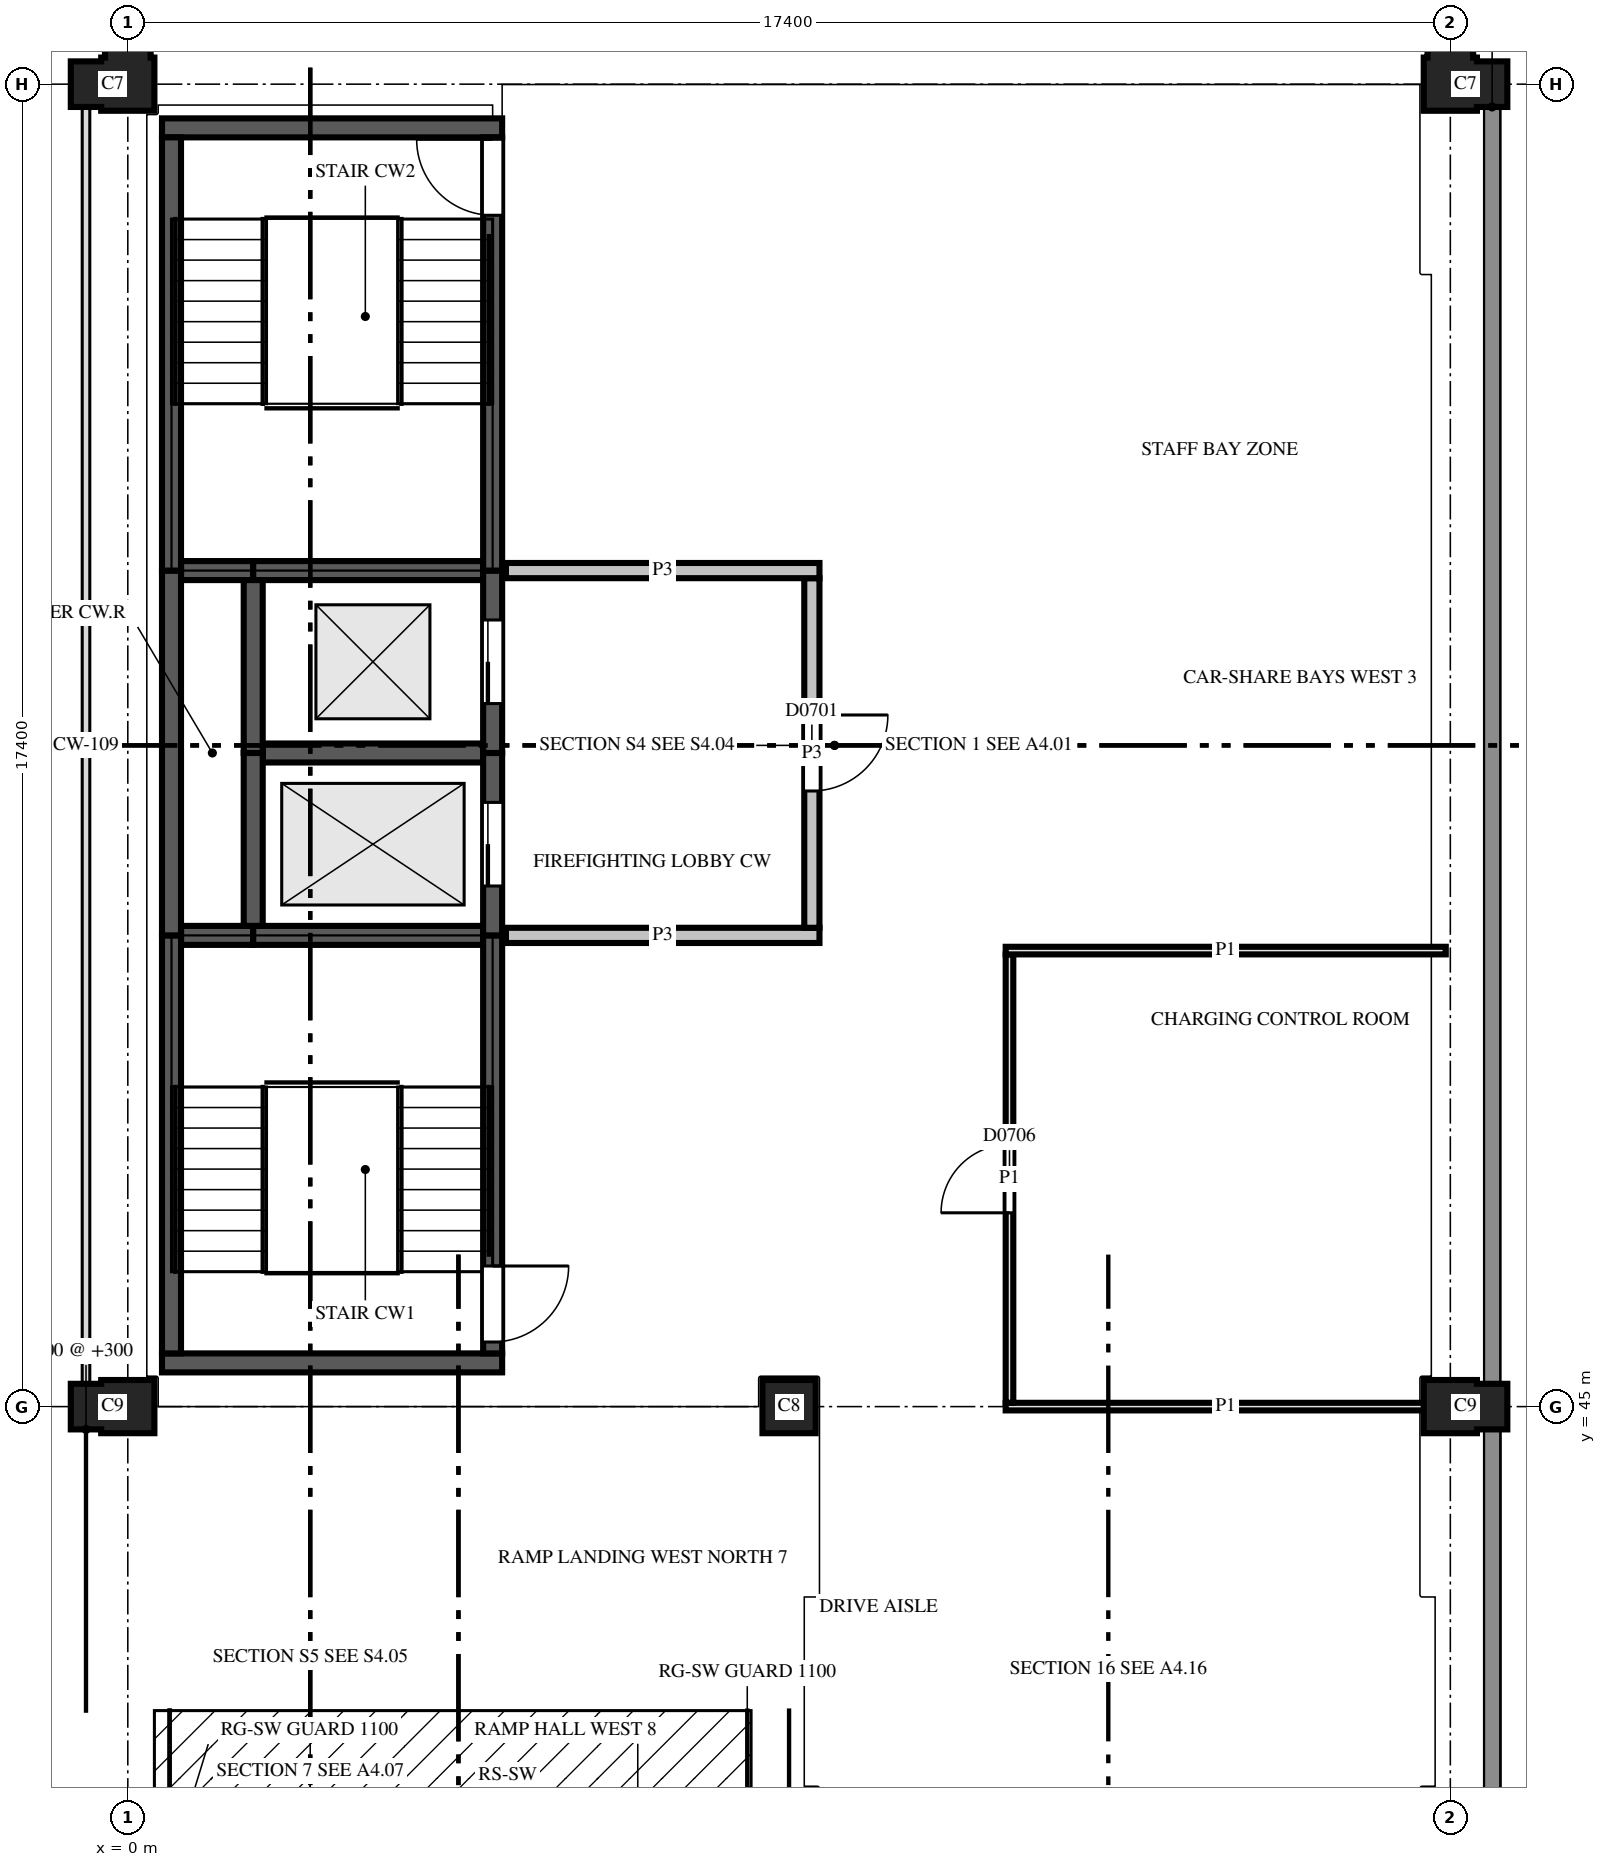
"""IFC4 building model, lengths in metres.
Left out: names, types, materials, properties, quantities, classifications, styles, units other than length and angle.
Written with IfcOpenShell. Run it as: python <this file> out.ifc"""

import sys

from ifc_helpers import new_model, si_unit, direction, frame, frame_2d, origin, place, context, subcontext, project, spatial, polyline, rectangle, outline, extrude, element, fill, save


model = new_model("IFC4")
c1 = context("Model", 3, precision=1e-05, world=origin(), true_north=direction((0.0, 1.0)))
c2 = subcontext(c1, "Body", "Model", "MODEL_VIEW")
j1 = project(units=[si_unit("LENGTHUNIT", "METRE"), si_unit("PLANEANGLEUNIT", "RADIAN")], contexts=[c1])
p1 = place(None, origin())
s1 = spatial("IfcSite", under=j1, at=p1, CompositionType="ELEMENT")
p2 = place(p1, origin())
s2 = spatial("IfcBuilding", under=s1, at=p2, CompositionType="ELEMENT")
p3 = place(p2, frame((0.0, 0.0, 26.7)))
s3 = spatial("IfcBuildingStorey", under=s2, at=p3, CompositionType="ELEMENT", Elevation=26.7)
p4 = place(p3, frame((0.0, 45.0, 0.0), z_axis=(0.0, 0.0, 1.0), x_axis=(-1.0, 0.0, 0.0)))
e1 = element("IfcColumn", 1, at=p4, inside=s3, PredefinedType="COLUMN", context=c2, shape_type="SweptSolid", body=[
    extrude(outline(polyline([(-0.35, -0.35), (0.35, -0.35), (0.35, -0.3), (0.75, -0.3), (0.75, 0.3), (0.35, 0.3), (0.35, 0.35), (-0.35, 0.35), (-0.35, -0.35)])), origin(), (0.0, 0.0, 1.0), 3.7),
])
p5 = place(p3, frame((8.7, 45.0, 0.0), z_axis=(0.0, 0.0, 1.0), x_axis=(1.0, 0.0, 0.0)))
e2 = element("IfcColumn", 2, at=p5, inside=s3, PredefinedType="COLUMN", context=c2, shape_type="SweptSolid", body=[
    extrude(outline(polyline([(-0.35, -0.35), (0.35, -0.35), (0.35, 0.35), (-0.35, 0.35), (-0.35, -0.35)])), origin(), (0.0, 0.0, 1.0), 3.7),
])
p6 = place(p3, frame((17.4, 45.0, 0.0), z_axis=(0.0, 0.0, 1.0), x_axis=(1.0, 0.0, 0.0)))
e3 = element("IfcColumn", 3, at=p6, inside=s3, PredefinedType="COLUMN", context=c2, shape_type="SweptSolid", body=[
    extrude(outline(polyline([(-0.35, -0.35), (0.35, -0.35), (0.35, -0.3), (0.75, -0.3), (0.75, 0.3), (0.35, 0.3), (0.35, 0.35), (-0.35, 0.35), (-0.35, -0.35)])), origin(), (0.0, 0.0, 1.0), 3.7),
])
for number, where, z_axis, x_axis in (
    (4, (0.0, 62.4, 0.0), (0.0, 0.0, 1.0), (0.0, 1.0, 0.0)),
    (5, (17.4, 62.4, 0.0), (0.0, 0.0, 1.0), (1.0, 0.0, 0.0)),
):
    element("IfcColumn", number, at=place(p3, frame(where, z_axis=z_axis, x_axis=x_axis)), inside=s3, PredefinedType="COLUMN", context=c2, shape_type="SweptSolid", body=[
        extrude(outline(polyline([(-0.35, -0.35), (0.35, -0.35), (0.35, -0.3), (0.75, -0.3), (0.75, 0.3), (0.35, 0.3), (0.35, 0.35), (0.3, 0.35), (0.3, 0.75), (-0.3, 0.75), (-0.3, 0.35), (-0.35, 0.35), (-0.35, -0.35)])), origin(), (0.0, 0.0, 1.0), 3.7),
    ])
p7 = place(p3, frame((0.45, 45.575, 0.0), z_axis=(0.0, 0.0, 1.0), x_axis=(1.0, 0.0, 0.0)))
e6 = element("IfcWall", 6, at=p7, inside=s3, PredefinedType="SHEAR", context=c2, shape_type="SweptSolid", body=[
    extrude(rectangle(XDim=4.475, YDim=0.25, at=frame_2d((2.238, 0.0))), origin(), (0.0, 0.0, 1.0), 3.7),
])
p8 = place(p3, frame((0.7, 51.2, 0.0), z_axis=(0.0, 0.0, 1.0), x_axis=(1.0, 0.0, 0.0)))
e7 = element("IfcWall", 7, at=p8, inside=s3, PredefinedType="SHEAR", context=c2, shape_type="SweptSolid", body=[
    extrude(rectangle(XDim=0.95, YDim=0.25, at=frame_2d((0.475, 0.0))), origin(), (0.0, 0.0, 1.0), 3.7),
])
p9 = place(p3, frame((1.65, 51.2, 0.0), z_axis=(0.0, 0.0, 1.0), x_axis=(1.0, 0.0, 0.0)))
e8 = element("IfcWall", 8, at=p9, inside=s3, PredefinedType="SHEAR", context=c2, shape_type="SweptSolid", body=[
    extrude(rectangle(XDim=3.025, YDim=0.25, at=frame_2d((1.513, 0.0))), origin(), (0.0, 0.0, 1.0), 3.7),
])
p10 = place(p3, frame((1.775, 53.6, 0.0), z_axis=(0.0, 0.0, 1.0), x_axis=(1.0, 0.0, 0.0)))
e9 = element("IfcWall", 9, at=p10, inside=s3, PredefinedType="SHEAR", context=c2, shape_type="SweptSolid", body=[
    extrude(rectangle(XDim=2.9, YDim=0.25, at=frame_2d((1.45, 0.0))), origin(), (0.0, 0.0, 1.0), 3.7),
])
p11 = place(p3, frame((0.7, 56.0, 0.0), z_axis=(0.0, 0.0, 1.0), x_axis=(1.0, 0.0, 0.0)))
e10 = element("IfcWall", 10, at=p11, inside=s3, PredefinedType="SHEAR", context=c2, shape_type="SweptSolid", body=[
    extrude(rectangle(XDim=0.95, YDim=0.25, at=frame_2d((0.475, 0.0))), origin(), (0.0, 0.0, 1.0), 3.7),
])
p12 = place(p3, frame((1.65, 56.0, 0.0), z_axis=(0.0, 0.0, 1.0), x_axis=(1.0, 0.0, 0.0)))
e11 = element("IfcWall", 11, at=p12, inside=s3, PredefinedType="SHEAR", context=c2, shape_type="SweptSolid", body=[
    extrude(rectangle(XDim=3.025, YDim=0.25, at=frame_2d((1.513, 0.0))), origin(), (0.0, 0.0, 1.0), 3.7),
])
p13 = place(p3, frame((0.45, 61.825, 0.0), z_axis=(0.0, 0.0, 1.0), x_axis=(1.0, 0.0, 0.0)))
e12 = element("IfcWall", 12, at=p13, inside=s3, PredefinedType="SHEAR", context=c2, shape_type="SweptSolid", body=[
    extrude(rectangle(XDim=4.475, YDim=0.25, at=frame_2d((2.238, 0.0))), origin(), (0.0, 0.0, 1.0), 3.7),
])
p14 = place(p3, frame((0.575, 45.7, 0.0), z_axis=(0.0, 0.0, 1.0), x_axis=(0.0, 1.0, 0.0)))
e13 = element("IfcWall", 13, at=p14, inside=s3, PredefinedType="SHEAR", context=c2, shape_type="SweptSolid", body=[
    extrude(rectangle(XDim=5.5, YDim=0.25, at=frame_2d((2.75, 0.0))), origin(), (0.0, 0.0, 1.0), 3.7),
])
p15 = place(p3, frame((0.575, 51.2, 0.0), z_axis=(0.0, 0.0, 1.0), x_axis=(0.0, 1.0, 0.0)))
e14 = element("IfcWall", 14, at=p15, inside=s3, PredefinedType="SHEAR", context=c2, shape_type="SweptSolid", body=[
    extrude(rectangle(XDim=4.8, YDim=0.25, at=frame_2d((2.4, 0.0))), origin(), (0.0, 0.0, 1.0), 3.7),
])
p16 = place(p3, frame((0.575, 56.0, 0.0), z_axis=(0.0, 0.0, 1.0), x_axis=(0.0, 1.0, 0.0)))
e15 = element("IfcWall", 15, at=p16, inside=s3, PredefinedType="SHEAR", context=c2, shape_type="SweptSolid", body=[
    extrude(rectangle(XDim=5.7, YDim=0.25, at=frame_2d((2.85, 0.0))), origin(), (0.0, 0.0, 1.0), 3.7),
])
p17 = place(p3, frame((1.65, 51.325, 0.0), z_axis=(0.0, 0.0, 1.0), x_axis=(0.0, 1.0, 0.0)))
e16 = element("IfcWall", 16, at=p17, inside=s3, PredefinedType="SHEAR", context=c2, shape_type="SweptSolid", body=[
    extrude(rectangle(XDim=2.275, YDim=0.25, at=frame_2d((1.138, 0.0))), origin(), (0.0, 0.0, 1.0), 3.7),
])
p18 = place(p3, frame((1.65, 53.6, 0.0), z_axis=(0.0, 0.0, 1.0), x_axis=(0.0, 1.0, 0.0)))
e17 = element("IfcWall", 17, at=p18, inside=s3, PredefinedType="SHEAR", context=c2, shape_type="SweptSolid", body=[
    extrude(rectangle(XDim=2.275, YDim=0.25, at=frame_2d((1.137, 0.0))), origin(), (0.0, 0.0, 1.0), 3.7),
])
p19 = place(p3, frame((4.8, 45.7, 0.0), z_axis=(0.0, 0.0, 1.0), x_axis=(0.0, 1.0, 0.0)))
e18 = element("IfcWall", 18, at=p19, inside=s3, PredefinedType="SHEAR", context=c2, shape_type="SweptSolid", body=[
    extrude(rectangle(XDim=5.5, YDim=0.25, at=frame_2d((2.75, 0.0))), origin(), (0.0, 0.0, 1.0), 3.7),
])
p20 = place(p19, frame((0.15, 0.0, 0.0)))
e19 = element("IfcOpeningElement", 19, at=p20, cuts=e18, PredefinedType="OPENING", context=c2, shape_type="SweptSolid", body=[
    extrude(rectangle(XDim=1.0, YDim=2.1, at=frame_2d((0.5, 1.05))), frame((0.0, 0.135, 0.0), z_axis=(0.0, -1.0, 0.0), x_axis=(1.0, 0.0, 0.0)), (0.0, 0.0, 1.0), 0.27),
])
p21 = place(p3, frame((4.8, 51.2, 0.0), z_axis=(0.0, 0.0, 1.0), x_axis=(0.0, 1.0, 0.0)))
e20 = element("IfcWall", 20, at=p21, inside=s3, PredefinedType="SHEAR", context=c2, shape_type="SweptSolid", body=[
    extrude(rectangle(XDim=2.4, YDim=0.25, at=frame_2d((1.2, 0.0))), origin(), (0.0, 0.0, 1.0), 3.7),
])
p22 = place(p21, frame((0.65, 0.0, 0.0)))
e21 = element("IfcOpeningElement", 21, at=p22, cuts=e20, PredefinedType="OPENING", context=c2, shape_type="SweptSolid", body=[
    extrude(rectangle(XDim=1.1, YDim=2.1, at=frame_2d((0.55, 1.05))), frame((0.0, 0.135, 0.0), z_axis=(0.0, -1.0, 0.0), x_axis=(1.0, 0.0, 0.0)), (0.0, 0.0, 1.0), 0.27),
])
p23 = place(p3, frame((4.8, 53.6, 0.0), z_axis=(0.0, 0.0, 1.0), x_axis=(0.0, 1.0, 0.0)))
e22 = element("IfcWall", 22, at=p23, inside=s3, PredefinedType="SHEAR", context=c2, shape_type="SweptSolid", body=[
    extrude(rectangle(XDim=2.4, YDim=0.25, at=frame_2d((1.2, 0.0))), origin(), (0.0, 0.0, 1.0), 3.7),
])
p24 = place(p23, frame((0.65, 0.0, 0.0)))
e23 = element("IfcOpeningElement", 23, at=p24, cuts=e22, PredefinedType="OPENING", context=c2, shape_type="SweptSolid", body=[
    extrude(rectangle(XDim=1.1, YDim=2.1, at=frame_2d((0.55, 1.05))), frame((0.0, 0.135, 0.0), z_axis=(0.0, -1.0, 0.0), x_axis=(1.0, 0.0, 0.0)), (0.0, 0.0, 1.0), 0.27),
])
p25 = place(p3, frame((4.8, 56.0, 0.0), z_axis=(0.0, 0.0, 1.0), x_axis=(0.0, 1.0, 0.0)))
e24 = element("IfcWall", 24, at=p25, inside=s3, PredefinedType="SHEAR", context=c2, shape_type="SweptSolid", body=[
    extrude(rectangle(XDim=5.7, YDim=0.25, at=frame_2d((2.85, 0.0))), origin(), (0.0, 0.0, 1.0), 3.7),
])
p26 = place(p25, frame((4.675, 0.0, 0.0)))
e25 = element("IfcOpeningElement", 25, at=p26, cuts=e24, PredefinedType="OPENING", context=c2, shape_type="SweptSolid", body=[
    extrude(rectangle(XDim=1.0, YDim=2.1, at=frame_2d((0.5, 1.05))), frame((0.0, 0.135, 0.0), z_axis=(0.0, -1.0, 0.0), x_axis=(1.0, 0.0, 0.0)), (0.0, 0.0, 1.0), 0.27),
])
p27 = place(p3, frame((11.55, 45.0, 0.0), z_axis=(0.0, 0.0, 1.0), x_axis=(1.0, 0.0, 0.0)))
e26 = element("IfcWall", 26, at=p27, inside=s3, PredefinedType="PARTITIONING", context=c2, shape_type="SweptSolid", body=[
    extrude(rectangle(XDim=5.79, YDim=0.1, at=frame_2d((2.895, 0.0))), origin(), (0.0, 0.0, 1.0), 2.88),
])
p28 = place(p3, frame((11.6, 50.95, 0.0), z_axis=(0.0, 0.0, 1.0), x_axis=(0.0, -1.0, 0.0)))
e27 = element("IfcWall", 27, at=p28, inside=s3, PredefinedType="PARTITIONING", context=c2, shape_type="SweptSolid", body=[
    extrude(rectangle(XDim=5.9, YDim=0.1, at=frame_2d((2.95, 0.0))), origin(), (0.0, 0.0, 1.0), 2.88),
])
p29 = place(p28, frame((2.5, 0.0, 0.0)))
e28 = element("IfcOpeningElement", 28, at=p29, cuts=e27, PredefinedType="OPENING", context=c2, shape_type="SweptSolid", body=[
    extrude(rectangle(XDim=0.9, YDim=2.1, at=frame_2d((0.45, 1.05))), frame((0.0, 0.06, 0.0), z_axis=(0.0, -1.0, 0.0), x_axis=(1.0, 0.0, 0.0)), (0.0, 0.0, 1.0), 0.12),
])
p30 = place(p3, frame((17.34, 51.0, 0.0), z_axis=(0.0, 0.0, 1.0), x_axis=(-1.0, 0.0, 0.0)))
e29 = element("IfcWall", 29, at=p30, inside=s3, PredefinedType="PARTITIONING", context=c2, shape_type="SweptSolid", body=[
    extrude(rectangle(XDim=5.79, YDim=0.1, at=frame_2d((2.895, 0.0))), origin(), (0.0, 0.0, 1.0), 2.88),
])
p31 = place(p3, frame((4.975, 51.2, 0.0), z_axis=(0.0, 0.0, 1.0), x_axis=(1.0, 0.0, 0.0)))
e30 = element("IfcWall", 30, at=p31, inside=s3, PredefinedType="PARTITIONING", context=c2, shape_type="SweptSolid", body=[
    extrude(rectangle(XDim=4.125, YDim=0.2, at=frame_2d((2.062, 0.0))), origin(), (0.0, 0.0, 1.0), 2.88),
])
p32 = place(p3, frame((9.0, 51.3, 0.0), z_axis=(0.0, 0.0, 1.0), x_axis=(0.0, 1.0, 0.0)))
e31 = element("IfcWall", 31, at=p32, inside=s3, PredefinedType="PARTITIONING", context=c2, shape_type="SweptSolid", body=[
    extrude(rectangle(XDim=4.6, YDim=0.2, at=frame_2d((2.3, 0.0))), origin(), (0.0, 0.0, 1.0), 2.88),
])
p33 = place(p32, frame((1.8, 0.0, 0.0)))
e32 = element("IfcOpeningElement", 32, at=p33, cuts=e31, PredefinedType="OPENING", context=c2, shape_type="SweptSolid", body=[
    extrude(rectangle(XDim=1.0, YDim=2.1, at=frame_2d((0.5, 1.05))), frame((0.0, 0.11, 0.0), z_axis=(0.0, -1.0, 0.0), x_axis=(1.0, 0.0, 0.0)), (0.0, 0.0, 1.0), 0.22),
])
p34 = place(p3, frame((9.1, 56.0, 0.0), z_axis=(0.0, 0.0, 1.0), x_axis=(-1.0, 0.0, 0.0)))
e33 = element("IfcWall", 33, at=p34, inside=s3, PredefinedType="PARTITIONING", context=c2, shape_type="SweptSolid", body=[
    extrude(rectangle(XDim=4.125, YDim=0.2, at=frame_2d((2.062, 0.0))), origin(), (0.0, 0.0, 1.0), 2.88),
])
p35 = place(p33, origin())
e34 = element("IfcDoor", 34, at=p35, inside=s3, OperationType="SINGLE_SWING_RIGHT", PredefinedType="DOOR", context=c2, shape_type="SweptSolid", body=[
    extrude(rectangle(XDim=1.0, YDim=2.1, at=frame_2d((0.5, 1.05))), frame((0.0, 0.025, 0.0), z_axis=(0.0, -1.0, 0.0), x_axis=(1.0, 0.0, 0.0)), (0.0, 0.0, 1.0), 0.05),
])
fill(e32, e34)
p36 = place(p29, origin())
e35 = element("IfcDoor", 35, at=p36, inside=s3, OperationType="SINGLE_SWING_RIGHT", PredefinedType="DOOR", context=c2, shape_type="SweptSolid", body=[
    extrude(rectangle(XDim=0.9, YDim=2.1, at=frame_2d((0.45, 1.05))), frame((0.0, 0.025, 0.0), z_axis=(0.0, -1.0, 0.0), x_axis=(1.0, 0.0, 0.0)), (0.0, 0.0, 1.0), 0.05),
])
fill(e28, e35)
p37 = place(p22, origin())
e36 = element("IfcDoor", 36, at=p37, inside=s3, OperationType="SLIDING_TO_LEFT", PredefinedType="DOOR", context=c2, shape_type="SweptSolid", body=[
    extrude(rectangle(XDim=1.1, YDim=2.1, at=frame_2d((0.55, 1.05))), frame((0.0, 0.025, 0.0), z_axis=(0.0, -1.0, 0.0), x_axis=(1.0, 0.0, 0.0)), (0.0, 0.0, 1.0), 0.05),
])
fill(e21, e36)
p38 = place(p24, origin())
e37 = element("IfcDoor", 37, at=p38, inside=s3, OperationType="SLIDING_TO_LEFT", PredefinedType="DOOR", context=c2, shape_type="SweptSolid", body=[
    extrude(rectangle(XDim=1.1, YDim=2.1, at=frame_2d((0.55, 1.05))), frame((0.0, 0.025, 0.0), z_axis=(0.0, -1.0, 0.0), x_axis=(1.0, 0.0, 0.0)), (0.0, 0.0, 1.0), 0.05),
])
fill(e23, e37)
p39 = place(p26, origin())
e38 = element("IfcDoor", 38, at=p39, inside=s3, OperationType="SINGLE_SWING_LEFT", PredefinedType="DOOR", context=c2, shape_type="SweptSolid", body=[
    extrude(rectangle(XDim=1.0, YDim=2.1, at=frame_2d((0.5, 1.05))), frame((0.0, 0.025, 0.0), z_axis=(0.0, -1.0, 0.0), x_axis=(1.0, 0.0, 0.0)), (0.0, 0.0, 1.0), 0.05),
])
fill(e25, e38)
p40 = place(p20, origin())
e39 = element("IfcDoor", 39, at=p40, inside=s3, OperationType="SINGLE_SWING_RIGHT", PredefinedType="DOOR", context=c2, shape_type="SweptSolid", body=[
    extrude(rectangle(XDim=1.0, YDim=2.1, at=frame_2d((0.5, 1.05))), frame((0.0, 0.025, 0.0), z_axis=(0.0, -1.0, 0.0), x_axis=(1.0, 0.0, 0.0)), (0.0, 0.0, 1.0), 0.05),
])
fill(e19, e39)
save(model, sys.argv[1])
